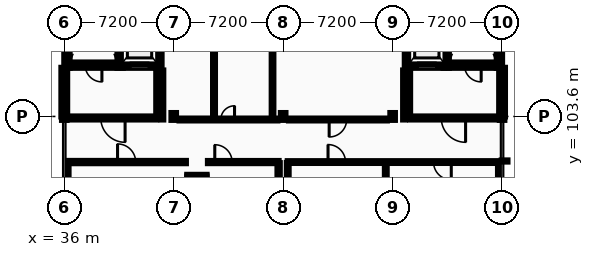
"""IFC4 building model, lengths in metres.
Left out: names, types, materials, properties, quantities, classifications, styles, units other than length and angle.
Written with IfcOpenShell. Run it as: python <this file> out.ifc"""

import sys

from ifc_helpers import new_model, si_unit, direction, frame, frame_2d, origin, origin_2d, place, context, subcontext, project, spatial, rectangle, i_section, extrude, element, fill, save


model = new_model("IFC4")
c1 = context("Model", 3, precision=1e-05, world=origin(), true_north=direction((0.0, 1.0)))
c2 = subcontext(c1, "Body", "Model", "MODEL_VIEW")
j1 = project(units=[si_unit("LENGTHUNIT", "METRE"), si_unit("PLANEANGLEUNIT", "RADIAN")], contexts=[c1])
p1 = place(None, origin())
s1 = spatial("IfcSite", under=j1, at=p1, CompositionType="ELEMENT")
p2 = place(p1, origin())
s2 = spatial("IfcBuilding", under=s1, at=p2, CompositionType="ELEMENT")
p3 = place(p2, frame((0.0, 0.0, 5.2)))
s3 = spatial("IfcBuildingStorey", under=s2, at=p3, CompositionType="ELEMENT", Elevation=5.2)
for number, where, z_axis, x_axis in (
    (1, (36.0, 103.6, 0.0), (0.0, 0.0, 1.0), (1.0, 0.0, 0.0)),
    (2, (43.2, 103.6, 0.0), (0.0, 0.0, 1.0), (1.0, 0.0, 0.0)),
    (3, (50.4, 103.6, 0.0), (0.0, 0.0, 1.0), (1.0, 0.0, 0.0)),
    (4, (57.6, 103.6, 0.0), (0.0, 0.0, 1.0), (1.0, 0.0, 0.0)),
    (5, (64.8, 103.6, 0.0), (0.0, 0.0, 1.0), (1.0, 0.0, 0.0)),
):
    element("IfcColumn", number, at=place(p3, frame(where, z_axis=z_axis, x_axis=x_axis)), inside=s3, PredefinedType="COLUMN", context=c2, shape_type="SweptSolid", body=[
        extrude(i_section(OverallWidth=0.3, OverallDepth=0.45, WebThickness=0.014, FlangeThickness=0.026, FilletRadius=0.027, at=origin_2d()), origin(), (0.0, 0.0, 1.0), 4.4),
    ])
p4 = place(p3, frame((36.0, 106.8, 0.0), z_axis=(0.0, 0.0, 1.0), x_axis=(0.0, -1.0, 0.0)))
e6 = element("IfcWall", 6, at=p4, inside=s3, PredefinedType="STANDARD", context=c2, shape_type="SweptSolid", body=[
    extrude(rectangle(XDim=3.2, YDim=0.38, at=frame_2d((1.6, 0.0))), origin(), (0.0, 0.0, 1.0), 4.185),
])
p5 = place(p4, frame((1.17, 0.0, 0.95)))
e7 = element("IfcOpeningElement", 7, at=p5, cuts=e6, PredefinedType="OPENING", context=c2, shape_type="SweptSolid", body=[
    extrude(rectangle(XDim=0.86, YDim=1.404, at=frame_2d((0.43, 0.702))), frame((0.0, 0.2, 0.0), z_axis=(0.0, -1.0, 0.0), x_axis=(1.0, 0.0, 0.0)), (0.0, 0.0, 1.0), 0.4),
])
p6 = place(p3, frame((64.8, 103.6, 0.0), z_axis=(0.0, 0.0, 1.0), x_axis=(0.0, 1.0, 0.0)))
e8 = element("IfcWall", 8, at=p6, inside=s3, PredefinedType="STANDARD", context=c2, shape_type="SweptSolid", body=[
    extrude(rectangle(XDim=3.2, YDim=0.38, at=frame_2d((1.6, 0.0))), origin(), (0.0, 0.0, 1.0), 4.185),
])
p7 = place(p6, frame((1.119, 0.0, 0.95)))
e9 = element("IfcOpeningElement", 9, at=p7, cuts=e8, PredefinedType="OPENING", context=c2, shape_type="SweptSolid", body=[
    extrude(rectangle(XDim=0.962, YDim=1.404, at=frame_2d((0.481, 0.702))), frame((0.0, 0.2, 0.0), z_axis=(0.0, -1.0, 0.0), x_axis=(1.0, 0.0, 0.0)), (0.0, 0.0, 1.0), 0.4),
])
p8 = place(p3, frame((36.35, 106.975, 0.0), z_axis=(0.0, 0.0, 1.0), x_axis=(1.0, 0.0, 0.0)))
e10 = element("IfcWall", 10, at=p8, inside=s3, PredefinedType="SHEAR", context=c2, shape_type="SweptSolid", body=[
    extrude(rectangle(XDim=3.15, YDim=0.35, at=frame_2d((1.575, 0.0))), origin(), (0.0, 0.0, 1.0), 4.185),
])
p9 = place(p8, frame((1.025, 0.0, 0.0)))
e11 = element("IfcOpeningElement", 11, at=p9, cuts=e10, PredefinedType="OPENING", context=c2, shape_type="SweptSolid", body=[
    extrude(rectangle(XDim=1.1, YDim=2.15, at=frame_2d((0.55, 1.075))), frame((0.0, 0.185, 0.0), z_axis=(0.0, -1.0, 0.0), x_axis=(1.0, 0.0, 0.0)), (0.0, 0.0, 1.0), 0.37),
])
for number, where, z_axis, x_axis in (
    (12, (36.175, 106.8, 0.0), (0.0, 0.0, 1.0), (0.0, 1.0, 0.0)),
    (13, (39.675, 106.8, 0.0), (0.0, 0.0, 1.0), (0.0, 1.0, 0.0)),
):
    element("IfcWall", number, at=place(p3, frame(where, z_axis=z_axis, x_axis=x_axis)), inside=s3, PredefinedType="SHEAR", context=c2, shape_type="SweptSolid", body=[
        extrude(rectangle(XDim=8.5, YDim=0.35, at=frame_2d((4.25, 0.0))), origin(), (0.0, 0.0, 1.0), 4.185),
    ])
p10 = place(p3, frame((39.85, 106.975, 0.0), z_axis=(0.0, 0.0, 1.0), x_axis=(1.0, 0.0, 0.0)))
e14 = element("IfcWall", 14, at=p10, inside=s3, PredefinedType="SHEAR", context=c2, shape_type="SweptSolid", body=[
    extrude(rectangle(XDim=2.2, YDim=0.35, at=frame_2d((1.1, 0.0))), origin(), (0.0, 0.0, 1.0), 4.185),
])
p11 = place(p10, frame((0.5, 0.0, 0.0)))
e15 = element("IfcOpeningElement", 15, at=p11, cuts=e14, PredefinedType="OPENING", context=c2, shape_type="SweptSolid", body=[
    extrude(rectangle(XDim=1.2, YDim=2.2, at=frame_2d((0.6, 1.1))), frame((0.0, 0.185, 0.0), z_axis=(0.0, -1.0, 0.0), x_axis=(1.0, 0.0, 0.0)), (0.0, 0.0, 1.0), 0.37),
])
p12 = place(p3, frame((42.225, 106.8, 0.0), z_axis=(0.0, 0.0, 1.0), x_axis=(0.0, 1.0, 0.0)))
e16 = element("IfcWall", 16, at=p12, inside=s3, PredefinedType="SHEAR", context=c2, shape_type="SweptSolid", body=[
    extrude(rectangle(XDim=3.7, YDim=0.35, at=frame_2d((1.85, 0.0))), origin(), (0.0, 0.0, 1.0), 4.185),
])
p13 = place(p3, frame((36.35, 103.5, 0.0), z_axis=(0.0, 0.0, 1.0), x_axis=(1.0, 0.0, 0.0)))
e17 = element("IfcWall", 17, at=p13, inside=s3, PredefinedType="PARTITIONING", context=c2, shape_type="SweptSolid", body=[
    extrude(rectangle(XDim=5.7, YDim=0.2, at=frame_2d((2.85, 0.0))), origin(), (0.0, 0.0, 1.0), 3.88),
])
p14 = place(p13, frame((2.05, 0.0, 0.0)))
e18 = element("IfcOpeningElement", 18, at=p14, cuts=e17, PredefinedType="OPENING", context=c2, shape_type="SweptSolid", body=[
    extrude(rectangle(XDim=1.6, YDim=2.2, at=frame_2d((0.8, 1.1))), frame((0.0, 0.11, 0.0), z_axis=(0.0, -1.0, 0.0), x_axis=(1.0, 0.0, 0.0)), (0.0, 0.0, 1.0), 0.22),
])
p15 = place(p3, frame((42.15, 103.6, 0.0), z_axis=(0.0, 0.0, 1.0), x_axis=(0.0, 1.0, 0.0)))
e19 = element("IfcWall", 19, at=p15, inside=s3, PredefinedType="PARTITIONING", context=c2, shape_type="SweptSolid", body=[
    extrude(rectangle(XDim=3.2, YDim=0.2, at=frame_2d((1.6, 0.0))), origin(), (0.0, 0.0, 1.0), 4.185),
])
p16 = place(p3, frame((61.3, 106.975, 0.0), z_axis=(0.0, 0.0, 1.0), x_axis=(1.0, 0.0, 0.0)))
e20 = element("IfcWall", 20, at=p16, inside=s3, PredefinedType="SHEAR", context=c2, shape_type="SweptSolid", body=[
    extrude(rectangle(XDim=3.15, YDim=0.35, at=frame_2d((1.575, 0.0))), origin(), (0.0, 0.0, 1.0), 4.185),
])
p17 = place(p16, frame((1.025, 0.0, 0.0)))
e21 = element("IfcOpeningElement", 21, at=p17, cuts=e20, PredefinedType="OPENING", context=c2, shape_type="SweptSolid", body=[
    extrude(rectangle(XDim=1.1, YDim=2.15, at=frame_2d((0.55, 1.075))), frame((0.0, 0.185, 0.0), z_axis=(0.0, -1.0, 0.0), x_axis=(1.0, 0.0, 0.0)), (0.0, 0.0, 1.0), 0.37),
])
for number, where, z_axis, x_axis in (
    (22, (61.125, 106.8, 0.0), (0.0, 0.0, 1.0), (0.0, 1.0, 0.0)),
    (23, (64.625, 106.8, 0.0), (0.0, 0.0, 1.0), (0.0, 1.0, 0.0)),
):
    element("IfcWall", number, at=place(p3, frame(where, z_axis=z_axis, x_axis=x_axis)), inside=s3, PredefinedType="SHEAR", context=c2, shape_type="SweptSolid", body=[
        extrude(rectangle(XDim=8.5, YDim=0.35, at=frame_2d((4.25, 0.0))), origin(), (0.0, 0.0, 1.0), 4.185),
    ])
p18 = place(p3, frame((58.75, 106.975, 0.0), z_axis=(0.0, 0.0, 1.0), x_axis=(1.0, 0.0, 0.0)))
e24 = element("IfcWall", 24, at=p18, inside=s3, PredefinedType="SHEAR", context=c2, shape_type="SweptSolid", body=[
    extrude(rectangle(XDim=2.2, YDim=0.35, at=frame_2d((1.1, 0.0))), origin(), (0.0, 0.0, 1.0), 4.185),
])
p19 = place(p18, frame((0.5, 0.0, 0.0)))
e25 = element("IfcOpeningElement", 25, at=p19, cuts=e24, PredefinedType="OPENING", context=c2, shape_type="SweptSolid", body=[
    extrude(rectangle(XDim=1.2, YDim=2.2, at=frame_2d((0.6, 1.1))), frame((0.0, 0.185, 0.0), z_axis=(0.0, -1.0, 0.0), x_axis=(1.0, 0.0, 0.0)), (0.0, 0.0, 1.0), 0.37),
])
p20 = place(p3, frame((58.575, 106.8, 0.0), z_axis=(0.0, 0.0, 1.0), x_axis=(0.0, 1.0, 0.0)))
e26 = element("IfcWall", 26, at=p20, inside=s3, PredefinedType="SHEAR", context=c2, shape_type="SweptSolid", body=[
    extrude(rectangle(XDim=3.7, YDim=0.35, at=frame_2d((1.85, 0.0))), origin(), (0.0, 0.0, 1.0), 4.185),
])
p21 = place(p3, frame((58.75, 103.5, 0.0), z_axis=(0.0, 0.0, 1.0), x_axis=(1.0, 0.0, 0.0)))
e27 = element("IfcWall", 27, at=p21, inside=s3, PredefinedType="PARTITIONING", context=c2, shape_type="SweptSolid", body=[
    extrude(rectangle(XDim=5.7, YDim=0.2, at=frame_2d((2.85, 0.0))), origin(), (0.0, 0.0, 1.0), 3.88),
])
p22 = place(p21, frame((2.05, 0.0, 0.0)))
e28 = element("IfcOpeningElement", 28, at=p22, cuts=e27, PredefinedType="OPENING", context=c2, shape_type="SweptSolid", body=[
    extrude(rectangle(XDim=1.6, YDim=2.2, at=frame_2d((0.8, 1.1))), frame((0.0, 0.11, 0.0), z_axis=(0.0, -1.0, 0.0), x_axis=(1.0, 0.0, 0.0)), (0.0, 0.0, 1.0), 0.22),
])
p23 = place(p3, frame((58.65, 103.6, 0.0), z_axis=(0.0, 0.0, 1.0), x_axis=(0.0, 1.0, 0.0)))
e29 = element("IfcWall", 29, at=p23, inside=s3, PredefinedType="PARTITIONING", context=c2, shape_type="SweptSolid", body=[
    extrude(rectangle(XDim=3.2, YDim=0.2, at=frame_2d((1.6, 0.0))), origin(), (0.0, 0.0, 1.0), 4.185),
])
p24 = place(p3, frame((44.09, 99.705, 0.0), z_axis=(0.0, 0.0, 1.0), x_axis=(1.0, 0.0, 0.0)))
e30 = element("IfcWall", 30, at=p24, inside=s3, PredefinedType="PARTITIONING", context=c2, shape_type="SweptSolid", body=[
    extrude(rectangle(XDim=1.27, YDim=0.11, at=frame_2d((0.635, 0.0))), origin(), (0.0, 0.0, 1.0), 4.185),
])
for number, where, z_axis, x_axis in (
    (31, (44.145, 98.6, 0.0), (0.0, 0.0, 1.0), (0.0, 1.0, 0.0)),
    (32, (45.305, 98.6, 0.0), (0.0, 0.0, 1.0), (0.0, 1.0, 0.0)),
):
    element("IfcWall", number, at=place(p3, frame(where, z_axis=z_axis, x_axis=x_axis)), inside=s3, PredefinedType="PARTITIONING", context=c2, shape_type="SweptSolid", body=[
        extrude(rectangle(XDim=1.05, YDim=0.11, at=frame_2d((0.525, 0.0))), origin(), (0.0, 0.0, 1.0), 4.185),
    ])
p25 = place(p3, frame((36.2, 100.6, 0.0), z_axis=(0.0, 0.0, 1.0), x_axis=(1.0, 0.0, 0.0)))
e33 = element("IfcWall", 33, at=p25, inside=s3, PredefinedType="PARTITIONING", context=c2, shape_type="SweptSolid", body=[
    extrude(rectangle(XDim=7.8, YDim=0.15, at=frame_2d((3.9, 0.0))), origin(), (0.0, 0.0, 1.0), 4.185),
])
p26 = place(p25, frame((3.304, 0.0, 0.0)))
e34 = element("IfcOpeningElement", 34, at=p26, cuts=e33, PredefinedType="OPENING", context=c2, shape_type="SweptSolid", body=[
    extrude(rectangle(XDim=1.192, YDim=2.124, at=frame_2d((0.596, 1.062))), frame((0.0, 0.085, 0.0), z_axis=(0.0, -1.0, 0.0), x_axis=(1.0, 0.0, 0.0)), (0.0, 0.0, 1.0), 0.17),
])
p27 = place(p3, frame((45.45, 100.6, 0.0), z_axis=(0.0, 0.0, 1.0), x_axis=(1.0, 0.0, 0.0)))
e35 = element("IfcWall", 35, at=p27, inside=s3, PredefinedType="PARTITIONING", context=c2, shape_type="SweptSolid", body=[
    extrude(rectangle(XDim=4.65, YDim=0.142, at=frame_2d((2.325, 0.0))), origin(), (0.0, 0.0, 1.0), 4.185),
])
p28 = place(p27, frame((0.45, 0.0, 0.0)))
e36 = element("IfcOpeningElement", 36, at=p28, cuts=e35, PredefinedType="OPENING", context=c2, shape_type="SweptSolid", body=[
    extrude(rectangle(XDim=1.14, YDim=2.124, at=frame_2d((0.57, 1.062))), frame((0.0, 0.081, 0.0), z_axis=(0.0, -1.0, 0.0), x_axis=(1.0, 0.0, 0.0)), (0.0, 0.0, 1.0), 0.162),
])
p29 = place(p3, frame((50.7, 100.6, 0.0), z_axis=(0.0, 0.0, 1.0), x_axis=(1.0, 0.0, 0.0)))
e37 = element("IfcWall", 37, at=p29, inside=s3, PredefinedType="PARTITIONING", context=c2, shape_type="SweptSolid", body=[
    extrude(rectangle(XDim=13.9, YDim=0.118, at=frame_2d((6.95, 0.0))), origin(), (0.0, 0.0, 1.0), 4.185),
])
p30 = place(p29, frame((2.65, 0.0, 0.0)))
e38 = element("IfcOpeningElement", 38, at=p30, cuts=e37, PredefinedType="OPENING", context=c2, shape_type="SweptSolid", body=[
    extrude(rectangle(XDim=1.15, YDim=2.15, at=frame_2d((0.575, 1.075))), frame((0.0, 0.069, 0.0), z_axis=(0.0, -1.0, 0.0), x_axis=(1.0, 0.0, 0.0)), (0.0, 0.0, 1.0), 0.138),
])
p31 = place(p29, frame((9.592, 0.0, 0.0)))
e39 = element("IfcOpeningElement", 39, at=p31, cuts=e37, PredefinedType="OPENING", context=c2, shape_type="SweptSolid", body=[
    extrude(rectangle(XDim=1.166, YDim=2.124, at=frame_2d((0.583, 1.062))), frame((0.0, 0.069, 0.0), z_axis=(0.0, -1.0, 0.0), x_axis=(1.0, 0.0, 0.0)), (0.0, 0.0, 1.0), 0.138),
])
p32 = place(p3, frame((43.58, 103.4, 0.0), z_axis=(0.0, 0.0, 1.0), x_axis=(1.0, 0.0, 0.0)))
e40 = element("IfcWall", 40, at=p32, inside=s3, PredefinedType="PARTITIONING", context=c2, shape_type="SweptSolid", body=[
    extrude(rectangle(XDim=6.44, YDim=0.125, at=frame_2d((3.22, 0.0))), origin(), (0.0, 0.0, 1.0), 3.88),
])
p33 = place(p32, frame((0.635, 0.0, 0.0)))
e41 = element("IfcOpeningElement", 41, at=p33, cuts=e40, PredefinedType="OPENING", context=c2, shape_type="SweptSolid", body=[
    extrude(rectangle(XDim=1.0, YDim=2.1, at=frame_2d((0.5, 1.05))), frame((0.0, 0.073, 0.0), z_axis=(0.0, -1.0, 0.0), x_axis=(1.0, 0.0, 0.0)), (0.0, 0.0, 1.0), 0.145),
])
p34 = place(p32, frame((2.72, 0.0, 0.0)))
e42 = element("IfcOpeningElement", 42, at=p34, cuts=e40, PredefinedType="OPENING", context=c2, shape_type="SweptSolid", body=[
    extrude(rectangle(XDim=0.9, YDim=2.1, at=frame_2d((0.45, 1.05))), frame((0.0, 0.073, 0.0), z_axis=(0.0, -1.0, 0.0), x_axis=(1.0, 0.0, 0.0)), (0.0, 0.0, 1.0), 0.145),
])
p35 = place(p3, frame((50.78, 103.4, 0.0), z_axis=(0.0, 0.0, 1.0), x_axis=(1.0, 0.0, 0.0)))
e43 = element("IfcWall", 43, at=p35, inside=s3, PredefinedType="PARTITIONING", context=c2, shape_type="SweptSolid", body=[
    extrude(rectangle(XDim=6.44, YDim=0.125, at=frame_2d((3.22, 0.0))), origin(), (0.0, 0.0, 1.0), 3.88),
])
p36 = place(p35, frame((2.645, 0.0, 0.0)))
e44 = element("IfcOpeningElement", 44, at=p36, cuts=e43, PredefinedType="OPENING", context=c2, shape_type="SweptSolid", body=[
    extrude(rectangle(XDim=1.15, YDim=2.15, at=frame_2d((0.575, 1.075))), frame((0.0, 0.073, 0.0), z_axis=(0.0, -1.0, 0.0), x_axis=(1.0, 0.0, 0.0)), (0.0, 0.0, 1.0), 0.145),
])
p37 = place(p3, frame((36.2, 96.78, 0.0), z_axis=(0.0, 0.0, 1.0), x_axis=(0.0, 1.0, 0.0)))
e45 = element("IfcWall", 45, at=p37, inside=s3, PredefinedType="PARTITIONING", context=c2, shape_type="SweptSolid", body=[
    extrude(rectangle(XDim=3.745, YDim=0.16, at=frame_2d((1.873, 0.0))), origin(), (0.0, 0.0, 1.0), 3.81),
])
p38 = place(p3, frame((42.45, 103.4, 0.0), z_axis=(0.0, 0.0, 1.0), x_axis=(0.0, 1.0, 0.0)))
e46 = element("IfcWall", 46, at=p38, inside=s3, PredefinedType="PARTITIONING", context=c2, shape_type="SweptSolid", body=[
    extrude(rectangle(XDim=3.225, YDim=0.125, at=frame_2d((1.613, 0.0))), origin(), (0.0, 0.0, 1.0), 4.185),
])
p39 = place(p3, frame((45.85, 103.462, 0.0), z_axis=(0.0, 0.0, 1.0), x_axis=(0.0, 1.0, 0.0)))
e47 = element("IfcWall", 47, at=p39, inside=s3, PredefinedType="PARTITIONING", context=c2, shape_type="SweptSolid", body=[
    extrude(rectangle(XDim=14.338, YDim=0.125, at=frame_2d((7.169, 0.0))), origin(), (0.0, 0.0, 1.0), 4.185),
])
p40 = place(p3, frame((49.7, 103.462, 0.0), z_axis=(0.0, 0.0, 1.0), x_axis=(0.0, 1.0, 0.0)))
e48 = element("IfcWall", 48, at=p40, inside=s3, PredefinedType="PARTITIONING", context=c2, shape_type="SweptSolid", body=[
    extrude(rectangle(XDim=14.338, YDim=0.11, at=frame_2d((7.169, 0.0))), origin(), (0.0, 0.0, 1.0), 4.185),
])
p41 = place(p3, frame((50.1, 96.78, 0.0), z_axis=(0.0, 0.0, 1.0), x_axis=(0.0, 1.0, 0.0)))
e49 = element("IfcWall", 49, at=p41, inside=s3, PredefinedType="PARTITIONING", context=c2, shape_type="SweptSolid", body=[
    extrude(rectangle(XDim=3.749, YDim=0.15, at=frame_2d((1.875, 0.0))), origin(), (0.0, 0.0, 1.0), 3.88),
])
p42 = place(p3, frame((50.7, 96.78, 0.0), z_axis=(0.0, 0.0, 1.0), x_axis=(0.0, 1.0, 0.0)))
e50 = element("IfcWall", 50, at=p42, inside=s3, PredefinedType="PARTITIONING", context=c2, shape_type="SweptSolid", body=[
    extrude(rectangle(XDim=3.761, YDim=0.118, at=frame_2d((1.88, 0.0))), origin(), (0.0, 0.0, 1.0), 4.185),
])
p43 = place(p3, frame((57.15, 82.259, 0.0), z_axis=(0.0, 0.0, 1.0), x_axis=(0.0, 1.0, 0.0)))
e51 = element("IfcWall", 51, at=p43, inside=s3, PredefinedType="PARTITIONING", context=c2, shape_type="SweptSolid", body=[
    extrude(rectangle(XDim=18.282, YDim=0.118, at=frame_2d((9.141, 0.0))), origin(), (0.0, 0.0, 1.0), 4.185),
])
p44 = place(p3, frame((58.35, 103.4, 0.0), z_axis=(0.0, 0.0, 1.0), x_axis=(0.0, 1.0, 0.0)))
e52 = element("IfcWall", 52, at=p44, inside=s3, PredefinedType="PARTITIONING", context=c2, shape_type="SweptSolid", body=[
    extrude(rectangle(XDim=3.225, YDim=0.118, at=frame_2d((1.613, 0.0))), origin(), (0.0, 0.0, 1.0), 4.185),
])
p45 = place(p3, frame((64.6, 96.78, 0.0), z_axis=(0.0, 0.0, 1.0), x_axis=(0.0, 1.0, 0.0)))
e53 = element("IfcWall", 53, at=p45, inside=s3, PredefinedType="PARTITIONING", context=c2, shape_type="SweptSolid", body=[
    extrude(rectangle(XDim=3.761, YDim=0.135, at=frame_2d((1.88, 0.0))), origin(), (0.0, 0.0, 1.0), 3.81),
])
p46 = place(p5, origin())
e54 = element("IfcWindow", 54, at=p46, inside=s3, PartitioningType="SINGLE_PANEL", PredefinedType="WINDOW", context=c2, shape_type="SweptSolid", body=[
    extrude(rectangle(XDim=0.86, YDim=1.404, at=frame_2d((0.43, 0.702))), frame((0.0, 0.03, 0.0), z_axis=(0.0, -1.0, 0.0), x_axis=(1.0, 0.0, 0.0)), (0.0, 0.0, 1.0), 0.06),
])
fill(e7, e54)
p47 = place(p7, origin())
e55 = element("IfcWindow", 55, at=p47, inside=s3, PartitioningType="SINGLE_PANEL", PredefinedType="WINDOW", context=c2, shape_type="SweptSolid", body=[
    extrude(rectangle(XDim=0.962, YDim=1.404, at=frame_2d((0.481, 0.702))), frame((0.0, 0.03, 0.0), z_axis=(0.0, -1.0, 0.0), x_axis=(1.0, 0.0, 0.0)), (0.0, 0.0, 1.0), 0.06),
])
fill(e9, e55)
p48 = place(p9, origin())
e56 = element("IfcDoor", 56, at=p48, inside=s3, OperationType="SINGLE_SWING_RIGHT", PredefinedType="DOOR", context=c2, shape_type="SweptSolid", body=[
    extrude(rectangle(XDim=1.1, YDim=2.15, at=frame_2d((0.55, 1.075))), frame((0.0, 0.025, 0.0), z_axis=(0.0, -1.0, 0.0), x_axis=(1.0, 0.0, 0.0)), (0.0, 0.0, 1.0), 0.05),
])
fill(e11, e56)
p49 = place(p11, origin())
e57 = element("IfcDoor", 57, at=p49, inside=s3, OperationType="SLIDING_TO_RIGHT", PredefinedType="DOOR", context=c2, shape_type="SweptSolid", body=[
    extrude(rectangle(XDim=1.2, YDim=2.2, at=frame_2d((0.6, 1.1))), frame((0.0, 0.025, 0.0), z_axis=(0.0, -1.0, 0.0), x_axis=(1.0, 0.0, 0.0)), (0.0, 0.0, 1.0), 0.05),
])
fill(e15, e57)
p50 = place(p14, origin())
e58 = element("IfcDoor", 58, at=p50, inside=s3, OperationType="DOUBLE_DOOR_SINGLE_SWING", PredefinedType="DOOR", context=c2, shape_type="SweptSolid", body=[
    extrude(rectangle(XDim=1.6, YDim=2.2, at=frame_2d((0.8, 1.1))), frame((0.0, 0.025, 0.0), z_axis=(0.0, -1.0, 0.0), x_axis=(1.0, 0.0, 0.0)), (0.0, 0.0, 1.0), 0.05),
])
fill(e18, e58)
p51 = place(p17, origin())
e59 = element("IfcDoor", 59, at=p51, inside=s3, OperationType="SINGLE_SWING_RIGHT", PredefinedType="DOOR", context=c2, shape_type="SweptSolid", body=[
    extrude(rectangle(XDim=1.1, YDim=2.15, at=frame_2d((0.55, 1.075))), frame((0.0, 0.025, 0.0), z_axis=(0.0, -1.0, 0.0), x_axis=(1.0, 0.0, 0.0)), (0.0, 0.0, 1.0), 0.05),
])
fill(e21, e59)
p52 = place(p19, origin())
e60 = element("IfcDoor", 60, at=p52, inside=s3, OperationType="SLIDING_TO_RIGHT", PredefinedType="DOOR", context=c2, shape_type="SweptSolid", body=[
    extrude(rectangle(XDim=1.2, YDim=2.2, at=frame_2d((0.6, 1.1))), frame((0.0, 0.025, 0.0), z_axis=(0.0, -1.0, 0.0), x_axis=(1.0, 0.0, 0.0)), (0.0, 0.0, 1.0), 0.05),
])
fill(e25, e60)
p53 = place(p22, origin())
e61 = element("IfcDoor", 61, at=p53, inside=s3, OperationType="DOUBLE_DOOR_SINGLE_SWING", PredefinedType="DOOR", context=c2, shape_type="SweptSolid", body=[
    extrude(rectangle(XDim=1.6, YDim=2.2, at=frame_2d((0.8, 1.1))), frame((0.0, 0.025, 0.0), z_axis=(0.0, -1.0, 0.0), x_axis=(1.0, 0.0, 0.0)), (0.0, 0.0, 1.0), 0.05),
])
fill(e28, e61)
p54 = place(p33, frame((1.0, 0.0, 0.0), z_axis=(0.0, 0.0, 1.0), x_axis=(-1.0, 0.0, 0.0)))
e62 = element("IfcDoor", 62, at=p54, inside=s3, OperationType="SLIDING_TO_LEFT", PredefinedType="DOOR", context=c2, shape_type="SweptSolid", body=[
    extrude(rectangle(XDim=1.0, YDim=2.1, at=frame_2d((0.5, 1.05))), frame((0.0, 0.025, 0.0), z_axis=(0.0, -1.0, 0.0), x_axis=(1.0, 0.0, 0.0)), (0.0, 0.0, 1.0), 0.05),
])
fill(e41, e62)
p55 = place(p34, frame((0.9, 0.0, 0.0), z_axis=(0.0, 0.0, 1.0), x_axis=(-1.0, 0.0, 0.0)))
e63 = element("IfcDoor", 63, at=p55, inside=s3, OperationType="SINGLE_SWING_RIGHT", PredefinedType="DOOR", context=c2, shape_type="SweptSolid", body=[
    extrude(rectangle(XDim=0.9, YDim=2.1, at=frame_2d((0.45, 1.05))), frame((0.0, 0.025, 0.0), z_axis=(0.0, -1.0, 0.0), x_axis=(1.0, 0.0, 0.0)), (0.0, 0.0, 1.0), 0.05),
])
fill(e42, e63)
p56 = place(p28, origin())
e64 = element("IfcDoor", 64, at=p56, inside=s3, OperationType="SINGLE_SWING_LEFT", PredefinedType="DOOR", context=c2, shape_type="SweptSolid", body=[
    extrude(rectangle(XDim=1.14, YDim=2.124, at=frame_2d((0.57, 1.062))), frame((0.0, 0.025, 0.0), z_axis=(0.0, -1.0, 0.0), x_axis=(1.0, 0.0, 0.0)), (0.0, 0.0, 1.0), 0.05),
])
fill(e36, e64)
p57 = place(p30, origin())
e65 = element("IfcDoor", 65, at=p57, inside=s3, OperationType="SINGLE_SWING_LEFT", PredefinedType="DOOR", context=c2, shape_type="SweptSolid", body=[
    extrude(rectangle(XDim=1.15, YDim=2.15, at=frame_2d((0.575, 1.075))), frame((0.0, 0.025, 0.0), z_axis=(0.0, -1.0, 0.0), x_axis=(1.0, 0.0, 0.0)), (0.0, 0.0, 1.0), 0.05),
])
fill(e38, e65)
p58 = place(p36, frame((1.15, 0.0, 0.0), z_axis=(0.0, 0.0, 1.0), x_axis=(-1.0, 0.0, 0.0)))
e66 = element("IfcDoor", 66, at=p58, inside=s3, OperationType="SINGLE_SWING_LEFT", PredefinedType="DOOR", context=c2, shape_type="SweptSolid", body=[
    extrude(rectangle(XDim=1.15, YDim=2.15, at=frame_2d((0.575, 1.075))), frame((0.0, 0.025, 0.0), z_axis=(0.0, -1.0, 0.0), x_axis=(1.0, 0.0, 0.0)), (0.0, 0.0, 1.0), 0.05),
])
fill(e44, e66)
p59 = place(p31, origin())
e67 = element("IfcDoor", 67, at=p59, inside=s3, OperationType="SINGLE_SWING_RIGHT", PredefinedType="DOOR", context=c2, shape_type="SweptSolid", body=[
    extrude(rectangle(XDim=1.166, YDim=2.124, at=frame_2d((0.583, 1.062))), frame((0.0, 0.025, 0.0), z_axis=(0.0, -1.0, 0.0), x_axis=(1.0, 0.0, 0.0)), (0.0, 0.0, 1.0), 0.05),
])
fill(e39, e67)
p60 = place(p26, origin())
e68 = element("IfcDoor", 68, at=p60, inside=s3, OperationType="SINGLE_SWING_LEFT", PredefinedType="DOOR", context=c2, shape_type="SweptSolid", body=[
    extrude(rectangle(XDim=1.192, YDim=2.124, at=frame_2d((0.596, 1.062))), frame((0.0, 0.025, 0.0), z_axis=(0.0, -1.0, 0.0), x_axis=(1.0, 0.0, 0.0)), (0.0, 0.0, 1.0), 0.05),
])
fill(e34, e68)
save(model, sys.argv[1])
